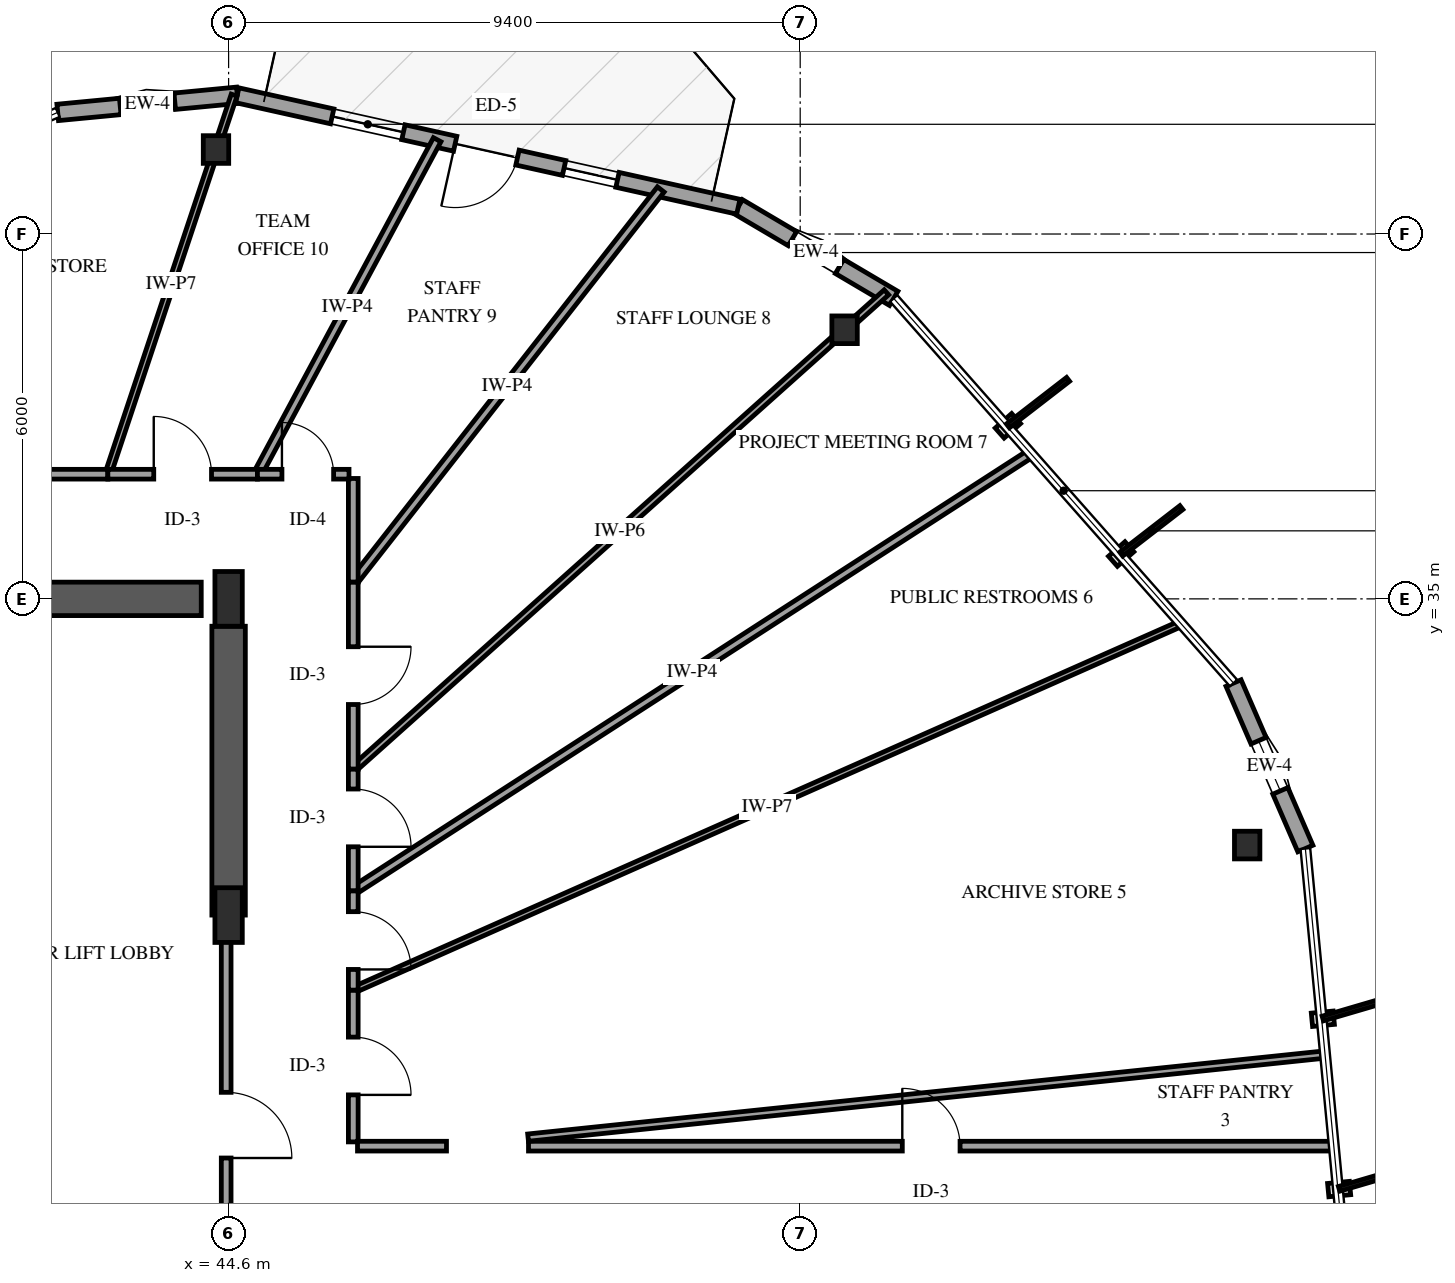
"""IFC4 building model, lengths in metres.
Left out: names, types, materials, properties, quantities, classifications, styles, units other than length and angle.
Written with IfcOpenShell. Run it as: python <this file> out.ifc"""

import sys

from ifc_helpers import new_model, si_unit, direction, frame, frame_2d, origin, origin_2d, place, context, subcontext, project, spatial, rectangle, i_section, extrude, element, fill, save


model = new_model("IFC4")
c1 = context("Model", 3, precision=1e-05, world=origin(), true_north=direction((0.0, 1.0)))
c2 = subcontext(c1, "Body", "Model", "MODEL_VIEW")
j1 = project(units=[si_unit("LENGTHUNIT", "METRE"), si_unit("PLANEANGLEUNIT", "RADIAN")], contexts=[c1])
p1 = place(None, origin())
s1 = spatial("IfcSite", under=j1, at=p1, CompositionType="ELEMENT")
p2 = place(p1, origin())
s2 = spatial("IfcBuilding", under=s1, at=p2, CompositionType="ELEMENT")
p3 = place(p2, frame((0.0, 0.0, 118.6)))
s3 = spatial("IfcBuildingStorey", under=s2, at=p3, CompositionType="ELEMENT", Elevation=118.6)
p4 = place(p3, frame((41.3, 35.0, 0.0), z_axis=(0.0, 0.0, 1.0), x_axis=(1.0, 0.0, 0.0)))
e1 = element("IfcWall", 1, at=p4, inside=s3, PredefinedType="SHEAR", context=c2, shape_type="SweptSolid", body=[
    extrude(rectangle(XDim=2.85, YDim=0.55, at=frame_2d((1.425, 0.0))), origin(), (0.0, 0.0, 1.0), 3.9),
])
p5 = place(p3, frame((44.6, 29.8, 0.0), z_axis=(0.0, 0.0, 1.0), x_axis=(0.0, 1.0, 0.0)))
e2 = element("IfcWall", 2, at=p5, inside=s3, PredefinedType="SHEAR", context=c2, shape_type="SweptSolid", body=[
    extrude(rectangle(XDim=4.75, YDim=0.55, at=frame_2d((2.375, 0.0))), origin(), (0.0, 0.0, 1.0), 3.9),
])
for number, where, z_axis, x_axis in (
    (3, (44.6, 29.8, 0.0), (0.0, 0.0, 1.0), (1.0, 0.0, 0.0)),
    (4, (44.6, 35.0, 0.0), (0.0, 0.0, 1.0), (1.0, 0.0, 0.0)),
):
    element("IfcColumn", number, at=place(p3, frame(where, z_axis=z_axis, x_axis=x_axis)), inside=s3, PredefinedType="PILASTER", context=c2, shape_type="SweptSolid", body=[
        extrude(rectangle(XDim=0.45, YDim=0.9, at=origin_2d()), origin(), (0.0, 0.0, 1.0), 3.9),
    ])
for number, where, z_axis, x_axis in (
    (5, (61.351, 30.951, 0.0), (0.0, 0.0, 1.0), (1.0, 0.0, 0.0)),
    (6, (54.73, 39.425, 0.0), (0.0, 0.0, 1.0), (1.0, 0.0, 0.0)),
    (7, (44.393, 42.389, 0.0), (0.0, 0.0, 1.0), (1.0, 0.0, 0.0)),
):
    element("IfcColumn", number, at=place(p3, frame(where, z_axis=z_axis, x_axis=x_axis)), inside=s3, PredefinedType="COLUMN", context=c2, shape_type="SweptSolid", body=[
        extrude(i_section(OverallWidth=0.418, OverallDepth=0.455, WebThickness=0.042, FlangeThickness=0.068, FilletRadius=0.038, at=origin_2d()), origin(), (0.0, 0.0, 1.0), 3.9),
    ])
p6 = place(p3, frame((55.538, 39.942, 0.0), z_axis=(0.0, 0.0, 1.0), x_axis=(-0.861303111476, 0.508091478144, 0.0)))
e8 = element("IfcWall", 8, at=p6, inside=s3, PredefinedType="SOLIDWALL", context=c2, shape_type="SweptSolid", body=[
    extrude(rectangle(XDim=2.967, YDim=0.27, at=frame_2d((1.483, 0.0))), origin(), (0.0, 0.0, 1.0), 2.979),
])
p7 = place(p6, frame((1.033, 0.0, 0.75)))
e9 = element("IfcOpeningElement", 9, at=p7, cuts=e8, PredefinedType="OPENING", context=c2, shape_type="SweptSolid", body=[
    extrude(rectangle(XDim=0.9, YDim=1.5, at=frame_2d((0.45, 0.75))), frame((0.0, 0.145, 0.0), z_axis=(0.0, -1.0, 0.0), x_axis=(1.0, 0.0, 0.0)), (0.0, 0.0, 1.0), 0.29),
])
p8 = place(p3, frame((44.743, 43.282, 0.0), z_axis=(0.0, 0.0, 1.0), x_axis=(-0.995464349716, -0.095135316491, 0.0)))
e10 = element("IfcWall", 10, at=p8, inside=s3, PredefinedType="SOLIDWALL", context=c2, shape_type="SweptSolid", body=[
    extrude(rectangle(XDim=2.967, YDim=0.27, at=frame_2d((1.483, 0.0))), origin(), (0.0, 0.0, 1.0), 2.979),
])
p9 = place(p8, frame((1.033, 0.0, 0.75)))
e11 = element("IfcOpeningElement", 11, at=p9, cuts=e10, PredefinedType="OPENING", context=c2, shape_type="SweptSolid", body=[
    extrude(rectangle(XDim=0.9, YDim=1.5, at=frame_2d((0.45, 0.75))), frame((0.0, 0.145, 0.0), z_axis=(0.0, -1.0, 0.0), x_axis=(1.0, 0.0, 0.0)), (0.0, 0.0, 1.0), 0.29),
])
p10 = place(p3, frame((52.982, 41.449, 0.0), z_axis=(0.0, 0.0, 1.0), x_axis=(-0.976144167336, 0.217123385606, 0.0)))
e12 = element("IfcWall", 12, at=p10, inside=s3, PredefinedType="SOLIDWALL", context=c2, shape_type="SweptSolid", body=[
    extrude(rectangle(XDim=8.441, YDim=0.25, at=frame_2d((4.221, 0.0))), origin(), (0.0, 0.0, 1.0), 2.979),
])
p11 = place(p10, frame((3.721, 0.0, 0.0)))
e13 = element("IfcOpeningElement", 13, at=p11, cuts=e12, PredefinedType="OPENING", context=c2, shape_type="SweptSolid", body=[
    extrude(rectangle(XDim=1.05, YDim=2.15, at=frame_2d((0.525, 1.075))), frame((0.0, 0.135, 0.0), z_axis=(0.0, -1.0, 0.0), x_axis=(1.0, 0.0, 0.0)), (0.0, 0.0, 1.0), 0.27),
])
p12 = place(p10, frame((2.035, 0.0, 0.72)))
e14 = element("IfcOpeningElement", 14, at=p12, cuts=e12, PredefinedType="OPENING", context=c2, shape_type="SweptSolid", body=[
    extrude(rectangle(XDim=0.9, YDim=1.5, at=frame_2d((0.45, 0.75))), frame((0.0, 0.135, 0.0), z_axis=(0.0, -1.0, 0.0), x_axis=(1.0, 0.0, 0.0)), (0.0, 0.0, 1.0), 0.27),
])
p13 = place(p10, frame((5.642, 0.0, 0.72)))
e15 = element("IfcOpeningElement", 15, at=p13, cuts=e12, PredefinedType="OPENING", context=c2, shape_type="SweptSolid", body=[
    extrude(rectangle(XDim=1.2, YDim=1.6, at=frame_2d((0.6, 0.8))), frame((0.0, 0.135, 0.0), z_axis=(0.0, -1.0, 0.0), x_axis=(1.0, 0.0, 0.0)), (0.0, 0.0, 1.0), 0.27),
])
p14 = place(p3, frame((62.308, 30.894, 0.0), z_axis=(0.0, 0.0, 1.0), x_axis=(-0.398166294024, 0.917313252004, 0.0)))
e16 = element("IfcWall", 16, at=p14, inside=s3, PredefinedType="SOLIDWALL", context=c2, shape_type="SweptSolid", body=[
    extrude(rectangle(XDim=2.967, YDim=0.27, at=frame_2d((1.483, 0.0))), origin(), (0.0, 0.0, 1.0), 2.979),
])
p15 = place(p14, frame((1.033, 0.0, 0.75)))
e17 = element("IfcOpeningElement", 17, at=p15, cuts=e16, PredefinedType="OPENING", context=c2, shape_type="SweptSolid", body=[
    extrude(rectangle(XDim=0.9, YDim=1.5, at=frame_2d((0.45, 0.75))), frame((0.0, 0.145, 0.0), z_axis=(0.0, -1.0, 0.0), x_axis=(1.0, 0.0, 0.0)), (0.0, 0.0, 1.0), 0.29),
])
p16 = place(p3, frame((46.65, 28.566, 0.0), z_axis=(0.0, 0.0, 1.0), x_axis=(0.914352425523, 0.404919302997, 0.0)))
e18 = element("IfcWall", 18, at=p16, inside=s3, PredefinedType="PARTITIONING", context=c2, shape_type="SweptSolid", body=[
    extrude(rectangle(XDim=14.887, YDim=0.1, at=frame_2d((7.444, 0.0))), origin(), (0.0, 0.0, 1.0), 3.6),
])
p17 = place(p3, frame((46.65, 30.197, 0.0), z_axis=(0.0, 0.0, 1.0), x_axis=(0.840080974796, 0.542461017757, 0.0)))
e19 = element("IfcWall", 19, at=p17, inside=s3, PredefinedType="PARTITIONING", context=c2, shape_type="SweptSolid", body=[
    extrude(rectangle(XDim=13.262, YDim=0.14, at=frame_2d((6.631, 0.0))), origin(), (0.0, 0.0, 1.0), 3.6),
])
p18 = place(p3, frame((49.532, 26.0, 0.0), z_axis=(0.0, 0.0, 1.0), x_axis=(1.0, 0.0, 0.0)))
e20 = element("IfcWall", 20, at=p18, inside=s3, PredefinedType="PARTITIONING", context=c2, shape_type="SweptSolid", body=[
    extrude(rectangle(XDim=13.243, YDim=0.16, at=frame_2d((6.622, 0.0))), origin(), (0.0, 0.0, 1.0), 3.6),
])
p19 = place(p18, frame((6.147, 0.0, 0.0)))
e21 = element("IfcOpeningElement", 21, at=p19, cuts=e20, PredefinedType="OPENING", context=c2, shape_type="SweptSolid", body=[
    extrude(rectangle(XDim=0.95, YDim=2.15, at=frame_2d((0.475, 1.075))), frame((0.0, 0.09, 0.0), z_axis=(0.0, -1.0, 0.0), x_axis=(1.0, 0.0, 0.0)), (0.0, 0.0, 1.0), 0.18),
])
p20 = place(p3, frame((49.525, 26.14, 0.0), z_axis=(0.0, 0.0, 1.0), x_axis=(0.994603084533, 0.103753092662, 0.0)))
e22 = element("IfcWall", 22, at=p20, inside=s3, PredefinedType="PARTITIONING", context=c2, shape_type="SweptSolid", body=[
    extrude(rectangle(XDim=13.177, YDim=0.12, at=frame_2d((6.589, 0.0))), origin(), (0.0, 0.0, 1.0), 3.6),
])
p21 = place(p3, frame((46.65, 32.199, 0.0), z_axis=(0.0, 0.0, 1.0), x_axis=(0.745371029952, 0.666649853903, 0.0)))
e23 = element("IfcWall", 23, at=p21, inside=s3, PredefinedType="PARTITIONING", context=c2, shape_type="SweptSolid", body=[
    extrude(rectangle(XDim=11.763, YDim=0.11, at=frame_2d((5.882, 0.0))), origin(), (0.0, 0.0, 1.0), 2.978),
])
p22 = place(p3, frame((46.65, 35.277, 0.0), z_axis=(0.0, 0.0, 1.0), x_axis=(0.616667817641, 0.787223476966, 0.0)))
e24 = element("IfcWall", 24, at=p22, inside=s3, PredefinedType="PARTITIONING", context=c2, shape_type="SweptSolid", body=[
    extrude(rectangle(XDim=8.201, YDim=0.14, at=frame_2d((4.1, 0.0))), origin(), (0.0, 0.0, 1.0), 2.978),
])
p23 = place(p3, frame((44.56, 29.8, 0.0), z_axis=(0.0, 0.0, 1.0), x_axis=(0.0, -1.0, 0.0)))
e25 = element("IfcWall", 25, at=p23, inside=s3, PredefinedType="PARTITIONING", context=c2, shape_type="SweptSolid", body=[
    extrude(rectangle(XDim=6.91, YDim=0.16, at=frame_2d((3.455, 0.0))), origin(), (0.0, 0.0, 1.0), 2.64),
])
p24 = place(p23, frame((2.915, 0.0, 0.0)))
e26 = element("IfcOpeningElement", 26, at=p24, cuts=e25, PredefinedType="OPENING", context=c2, shape_type="SweptSolid", body=[
    extrude(rectangle(XDim=1.08, YDim=2.15, at=frame_2d((0.54, 1.075))), frame((0.0, 0.09, 0.0), z_axis=(0.0, -1.0, 0.0), x_axis=(1.0, 0.0, 0.0)), (0.0, 0.0, 1.0), 0.18),
])
p25 = place(p3, frame((42.614, 37.05, 0.0), z_axis=(0.0, 0.0, 1.0), x_axis=(0.316038292766, 0.948746434779, 0.0)))
e27 = element("IfcWall", 27, at=p25, inside=s3, PredefinedType="PARTITIONING", context=c2, shape_type="SweptSolid", body=[
    extrude(rectangle(XDim=6.572, YDim=0.1, at=frame_2d((3.286, 0.0))), origin(), (0.0, 0.0, 1.0), 2.895),
])
p26 = place(p3, frame((45.074, 37.05, 0.0), z_axis=(0.0, 0.0, 1.0), x_axis=(0.473353633423, 0.880872486644, 0.0)))
e28 = element("IfcWall", 28, at=p26, inside=s3, PredefinedType="PARTITIONING", context=c2, shape_type="SweptSolid", body=[
    extrude(rectangle(XDim=6.245, YDim=0.14, at=frame_2d((3.123, 0.0))), origin(), (0.0, 0.0, 1.0), 3.6),
])
p27 = place(p3, frame((38.324, 37.05, 0.0), z_axis=(0.0, 0.0, 1.0), x_axis=(1.0, 0.0, 0.0)))
e29 = element("IfcWall", 29, at=p27, inside=s3, PredefinedType="PARTITIONING", context=c2, shape_type="SweptSolid", body=[
    extrude(rectangle(XDim=4.29, YDim=0.16, at=frame_2d((2.145, 0.0))), origin(), (0.0, 0.0, 1.0), 3.6),
])
p28 = place(p27, frame((1.67, 0.0, 0.0)))
e30 = element("IfcOpeningElement", 30, at=p28, cuts=e29, PredefinedType="OPENING", context=c2, shape_type="SweptSolid", body=[
    extrude(rectangle(XDim=0.95, YDim=2.15, at=frame_2d((0.475, 1.075))), frame((0.0, 0.09, 0.0), z_axis=(0.0, -1.0, 0.0), x_axis=(1.0, 0.0, 0.0)), (0.0, 0.0, 1.0), 0.18),
])
p29 = place(p3, frame((46.65, 35.277, 0.0), z_axis=(0.0, 0.0, 1.0), x_axis=(0.0, -1.0, 0.0)))
e31 = element("IfcWall", 31, at=p29, inside=s3, PredefinedType="PARTITIONING", context=c2, shape_type="SweptSolid", body=[
    extrude(rectangle(XDim=3.078, YDim=0.16, at=frame_2d((1.539, 0.0))), origin(), (0.0, 0.0, 1.0), 3.6),
])
p30 = place(p29, frame((1.064, 0.0, 0.0)))
e32 = element("IfcOpeningElement", 32, at=p30, cuts=e31, PredefinedType="OPENING", context=c2, shape_type="SweptSolid", body=[
    extrude(rectangle(XDim=0.95, YDim=2.15, at=frame_2d((0.475, 1.075))), frame((0.0, 0.09, 0.0), z_axis=(0.0, -1.0, 0.0), x_axis=(1.0, 0.0, 0.0)), (0.0, 0.0, 1.0), 0.18),
])
p31 = place(p3, frame((46.65, 28.566, 0.0), z_axis=(0.0, 0.0, 1.0), x_axis=(0.0, -1.0, 0.0)))
e33 = element("IfcWall", 33, at=p31, inside=s3, PredefinedType="PARTITIONING", context=c2, shape_type="SweptSolid", body=[
    extrude(rectangle(XDim=2.496, YDim=0.16, at=frame_2d((1.248, 0.0))), origin(), (0.0, 0.0, 1.0), 3.6),
])
p32 = place(p31, frame((0.773, 0.0, 0.0)))
e34 = element("IfcOpeningElement", 34, at=p32, cuts=e33, PredefinedType="OPENING", context=c2, shape_type="SweptSolid", body=[
    extrude(rectangle(XDim=0.95, YDim=2.15, at=frame_2d((0.475, 1.075))), frame((0.0, 0.09, 0.0), z_axis=(0.0, -1.0, 0.0), x_axis=(1.0, 0.0, 0.0)), (0.0, 0.0, 1.0), 0.18),
])
p33 = place(p3, frame((42.614, 37.05, 0.0), z_axis=(0.0, 0.0, 1.0), x_axis=(1.0, 0.0, 0.0)))
e35 = element("IfcWall", 35, at=p33, inside=s3, PredefinedType="PARTITIONING", context=c2, shape_type="SweptSolid", body=[
    extrude(rectangle(XDim=2.46, YDim=0.16, at=frame_2d((1.23, 0.0))), origin(), (0.0, 0.0, 1.0), 3.6),
])
p34 = place(p33, frame((0.755, 0.0, 0.0)))
e36 = element("IfcOpeningElement", 36, at=p34, cuts=e35, PredefinedType="OPENING", context=c2, shape_type="SweptSolid", body=[
    extrude(rectangle(XDim=0.95, YDim=2.15, at=frame_2d((0.475, 1.075))), frame((0.0, 0.09, 0.0), z_axis=(0.0, -1.0, 0.0), x_axis=(1.0, 0.0, 0.0)), (0.0, 0.0, 1.0), 0.18),
])
p35 = place(p3, frame((46.65, 32.199, 0.0), z_axis=(0.0, 0.0, 1.0), x_axis=(0.0, -1.0, 0.0)))
e37 = element("IfcWall", 37, at=p35, inside=s3, PredefinedType="PARTITIONING", context=c2, shape_type="SweptSolid", body=[
    extrude(rectangle(XDim=2.002, YDim=0.16, at=frame_2d((1.001, 0.0))), origin(), (0.0, 0.0, 1.0), 3.6),
])
p36 = place(p35, frame((0.326, 0.0, 0.0)))
e38 = element("IfcOpeningElement", 38, at=p36, cuts=e37, PredefinedType="OPENING", context=c2, shape_type="SweptSolid", body=[
    extrude(rectangle(XDim=0.95, YDim=2.15, at=frame_2d((0.475, 1.075))), frame((0.0, 0.09, 0.0), z_axis=(0.0, -1.0, 0.0), x_axis=(1.0, 0.0, 0.0)), (0.0, 0.0, 1.0), 0.18),
])
p37 = place(p3, frame((46.65, 36.98, 0.0), z_axis=(0.0, 0.0, 1.0), x_axis=(0.0, -1.0, 0.0)))
e39 = element("IfcWall", 39, at=p37, inside=s3, PredefinedType="PARTITIONING", context=c2, shape_type="SweptSolid", body=[
    extrude(rectangle(XDim=1.703, YDim=0.16, at=frame_2d((0.852, 0.0))), origin(), (0.0, 0.0, 1.0), 3.6),
])
p38 = place(p3, frame((46.65, 30.197, 0.0), z_axis=(0.0, 0.0, 1.0), x_axis=(0.0, -1.0, 0.0)))
e40 = element("IfcWall", 40, at=p38, inside=s3, PredefinedType="PARTITIONING", context=c2, shape_type="SweptSolid", body=[
    extrude(rectangle(XDim=1.631, YDim=0.16, at=frame_2d((0.815, 0.0))), origin(), (0.0, 0.0, 1.0), 3.6),
])
p39 = place(p38, frame((0.341, 0.0, 0.0)))
e41 = element("IfcOpeningElement", 41, at=p39, cuts=e40, PredefinedType="OPENING", context=c2, shape_type="SweptSolid", body=[
    extrude(rectangle(XDim=0.95, YDim=2.15, at=frame_2d((0.475, 1.075))), frame((0.0, 0.09, 0.0), z_axis=(0.0, -1.0, 0.0), x_axis=(1.0, 0.0, 0.0)), (0.0, 0.0, 1.0), 0.18),
])
p40 = place(p3, frame((45.074, 37.05, 0.0), z_axis=(0.0, 0.0, 1.0), x_axis=(1.0, 0.0, 0.0)))
e42 = element("IfcWall", 42, at=p40, inside=s3, PredefinedType="PARTITIONING", context=c2, shape_type="SweptSolid", body=[
    extrude(rectangle(XDim=1.506, YDim=0.16, at=frame_2d((0.753, 0.0))), origin(), (0.0, 0.0, 1.0), 3.6),
])
p41 = place(p40, frame((0.403, 0.0, 0.0)))
e43 = element("IfcOpeningElement", 43, at=p41, cuts=e42, PredefinedType="OPENING", context=c2, shape_type="SweptSolid", body=[
    extrude(rectangle(XDim=0.85, YDim=2.1, at=frame_2d((0.425, 1.05))), frame((0.0, 0.09, 0.0), z_axis=(0.0, -1.0, 0.0), x_axis=(1.0, 0.0, 0.0)), (0.0, 0.0, 1.0), 0.18),
])
p42 = place(p3, frame((46.72, 26.0, 0.0), z_axis=(0.0, 0.0, 1.0), x_axis=(1.0, 0.0, 0.0)))
e44 = element("IfcWall", 44, at=p42, inside=s3, PredefinedType="PARTITIONING", context=c2, shape_type="SweptSolid", body=[
    extrude(rectangle(XDim=1.463, YDim=0.16, at=frame_2d((0.731, 0.0))), origin(), (0.0, 0.0, 1.0), 3.6),
])
p43 = place(p7, origin())
e45 = element("IfcWindow", 45, at=p43, inside=s3, PartitioningType="SINGLE_PANEL", PredefinedType="WINDOW", context=c2, shape_type="SweptSolid", body=[
    extrude(rectangle(XDim=0.9, YDim=1.5, at=frame_2d((0.45, 0.75))), frame((0.0, 0.03, 0.0), z_axis=(0.0, -1.0, 0.0), x_axis=(1.0, 0.0, 0.0)), (0.0, 0.0, 1.0), 0.06),
])
fill(e9, e45)
p44 = place(p9, origin())
e46 = element("IfcWindow", 46, at=p44, inside=s3, PartitioningType="SINGLE_PANEL", PredefinedType="WINDOW", context=c2, shape_type="SweptSolid", body=[
    extrude(rectangle(XDim=0.9, YDim=1.5, at=frame_2d((0.45, 0.75))), frame((0.0, 0.03, 0.0), z_axis=(0.0, -1.0, 0.0), x_axis=(1.0, 0.0, 0.0)), (0.0, 0.0, 1.0), 0.06),
])
fill(e11, e46)
p45 = place(p11, origin())
e47 = element("IfcDoor", 47, at=p45, inside=s3, OperationType="SINGLE_SWING_RIGHT", PredefinedType="DOOR", context=c2, shape_type="SweptSolid", body=[
    extrude(rectangle(XDim=1.05, YDim=2.15, at=frame_2d((0.525, 1.075))), frame((0.0, 0.025, 0.0), z_axis=(0.0, -1.0, 0.0), x_axis=(1.0, 0.0, 0.0)), (0.0, 0.0, 1.0), 0.05),
])
fill(e13, e47)
p46 = place(p12, origin())
e48 = element("IfcWindow", 48, at=p46, inside=s3, PartitioningType="SINGLE_PANEL", PredefinedType="WINDOW", context=c2, shape_type="SweptSolid", body=[
    extrude(rectangle(XDim=0.9, YDim=1.5, at=frame_2d((0.45, 0.75))), frame((0.0, 0.03, 0.0), z_axis=(0.0, -1.0, 0.0), x_axis=(1.0, 0.0, 0.0)), (0.0, 0.0, 1.0), 0.06),
])
fill(e14, e48)
p47 = place(p13, origin())
e49 = element("IfcWindow", 49, at=p47, inside=s3, PartitioningType="SINGLE_PANEL", PredefinedType="WINDOW", context=c2, shape_type="SweptSolid", body=[
    extrude(rectangle(XDim=1.2, YDim=1.6, at=frame_2d((0.6, 0.8))), frame((0.0, 0.03, 0.0), z_axis=(0.0, -1.0, 0.0), x_axis=(1.0, 0.0, 0.0)), (0.0, 0.0, 1.0), 0.06),
])
fill(e15, e49)
p48 = place(p15, origin())
e50 = element("IfcWindow", 50, at=p48, inside=s3, PartitioningType="SINGLE_PANEL", PredefinedType="WINDOW", context=c2, shape_type="SweptSolid", body=[
    extrude(rectangle(XDim=0.9, YDim=1.5, at=frame_2d((0.45, 0.75))), frame((0.0, 0.03, 0.0), z_axis=(0.0, -1.0, 0.0), x_axis=(1.0, 0.0, 0.0)), (0.0, 0.0, 1.0), 0.06),
])
fill(e17, e50)
p49 = place(p19, origin())
e51 = element("IfcDoor", 51, at=p49, inside=s3, OperationType="SINGLE_SWING_LEFT", PredefinedType="DOOR", context=c2, shape_type="SweptSolid", body=[
    extrude(rectangle(XDim=0.95, YDim=2.15, at=frame_2d((0.475, 1.075))), frame((0.0, 0.025, 0.0), z_axis=(0.0, -1.0, 0.0), x_axis=(1.0, 0.0, 0.0)), (0.0, 0.0, 1.0), 0.05),
])
fill(e21, e51)
p50 = place(p24, origin())
e52 = element("IfcDoor", 52, at=p50, inside=s3, OperationType="SINGLE_SWING_RIGHT", PredefinedType="DOOR", context=c2, shape_type="SweptSolid", body=[
    extrude(rectangle(XDim=1.08, YDim=2.15, at=frame_2d((0.54, 1.075))), frame((0.0, 0.025, 0.0), z_axis=(0.0, -1.0, 0.0), x_axis=(1.0, 0.0, 0.0)), (0.0, 0.0, 1.0), 0.05),
])
fill(e26, e52)
p51 = place(p30, origin())
e53 = element("IfcDoor", 53, at=p51, inside=s3, OperationType="SINGLE_SWING_LEFT", PredefinedType="DOOR", context=c2, shape_type="SweptSolid", body=[
    extrude(rectangle(XDim=0.95, YDim=2.15, at=frame_2d((0.475, 1.075))), frame((0.0, 0.025, 0.0), z_axis=(0.0, -1.0, 0.0), x_axis=(1.0, 0.0, 0.0)), (0.0, 0.0, 1.0), 0.05),
])
fill(e32, e53)
p52 = place(p32, origin())
e54 = element("IfcDoor", 54, at=p52, inside=s3, OperationType="SINGLE_SWING_RIGHT", PredefinedType="DOOR", context=c2, shape_type="SweptSolid", body=[
    extrude(rectangle(XDim=0.95, YDim=2.15, at=frame_2d((0.475, 1.075))), frame((0.0, 0.025, 0.0), z_axis=(0.0, -1.0, 0.0), x_axis=(1.0, 0.0, 0.0)), (0.0, 0.0, 1.0), 0.05),
])
fill(e34, e54)
p53 = place(p34, origin())
e55 = element("IfcDoor", 55, at=p53, inside=s3, OperationType="SINGLE_SWING_LEFT", PredefinedType="DOOR", context=c2, shape_type="SweptSolid", body=[
    extrude(rectangle(XDim=0.95, YDim=2.15, at=frame_2d((0.475, 1.075))), frame((0.0, 0.025, 0.0), z_axis=(0.0, -1.0, 0.0), x_axis=(1.0, 0.0, 0.0)), (0.0, 0.0, 1.0), 0.05),
])
fill(e36, e55)
p54 = place(p36, origin())
e56 = element("IfcDoor", 56, at=p54, inside=s3, OperationType="SINGLE_SWING_RIGHT", PredefinedType="DOOR", context=c2, shape_type="SweptSolid", body=[
    extrude(rectangle(XDim=0.95, YDim=2.15, at=frame_2d((0.475, 1.075))), frame((0.0, 0.025, 0.0), z_axis=(0.0, -1.0, 0.0), x_axis=(1.0, 0.0, 0.0)), (0.0, 0.0, 1.0), 0.05),
])
fill(e38, e56)
p55 = place(p39, origin())
e57 = element("IfcDoor", 57, at=p55, inside=s3, OperationType="SINGLE_SWING_RIGHT", PredefinedType="DOOR", context=c2, shape_type="SweptSolid", body=[
    extrude(rectangle(XDim=0.95, YDim=2.15, at=frame_2d((0.475, 1.075))), frame((0.0, 0.025, 0.0), z_axis=(0.0, -1.0, 0.0), x_axis=(1.0, 0.0, 0.0)), (0.0, 0.0, 1.0), 0.05),
])
fill(e41, e57)
p56 = place(p41, origin())
e58 = element("IfcDoor", 58, at=p56, inside=s3, OperationType="SINGLE_SWING_LEFT", PredefinedType="DOOR", context=c2, shape_type="SweptSolid", body=[
    extrude(rectangle(XDim=0.85, YDim=2.1, at=frame_2d((0.425, 1.05))), frame((0.0, 0.025, 0.0), z_axis=(0.0, -1.0, 0.0), x_axis=(1.0, 0.0, 0.0)), (0.0, 0.0, 1.0), 0.05),
])
fill(e43, e58)
save(model, sys.argv[1])
